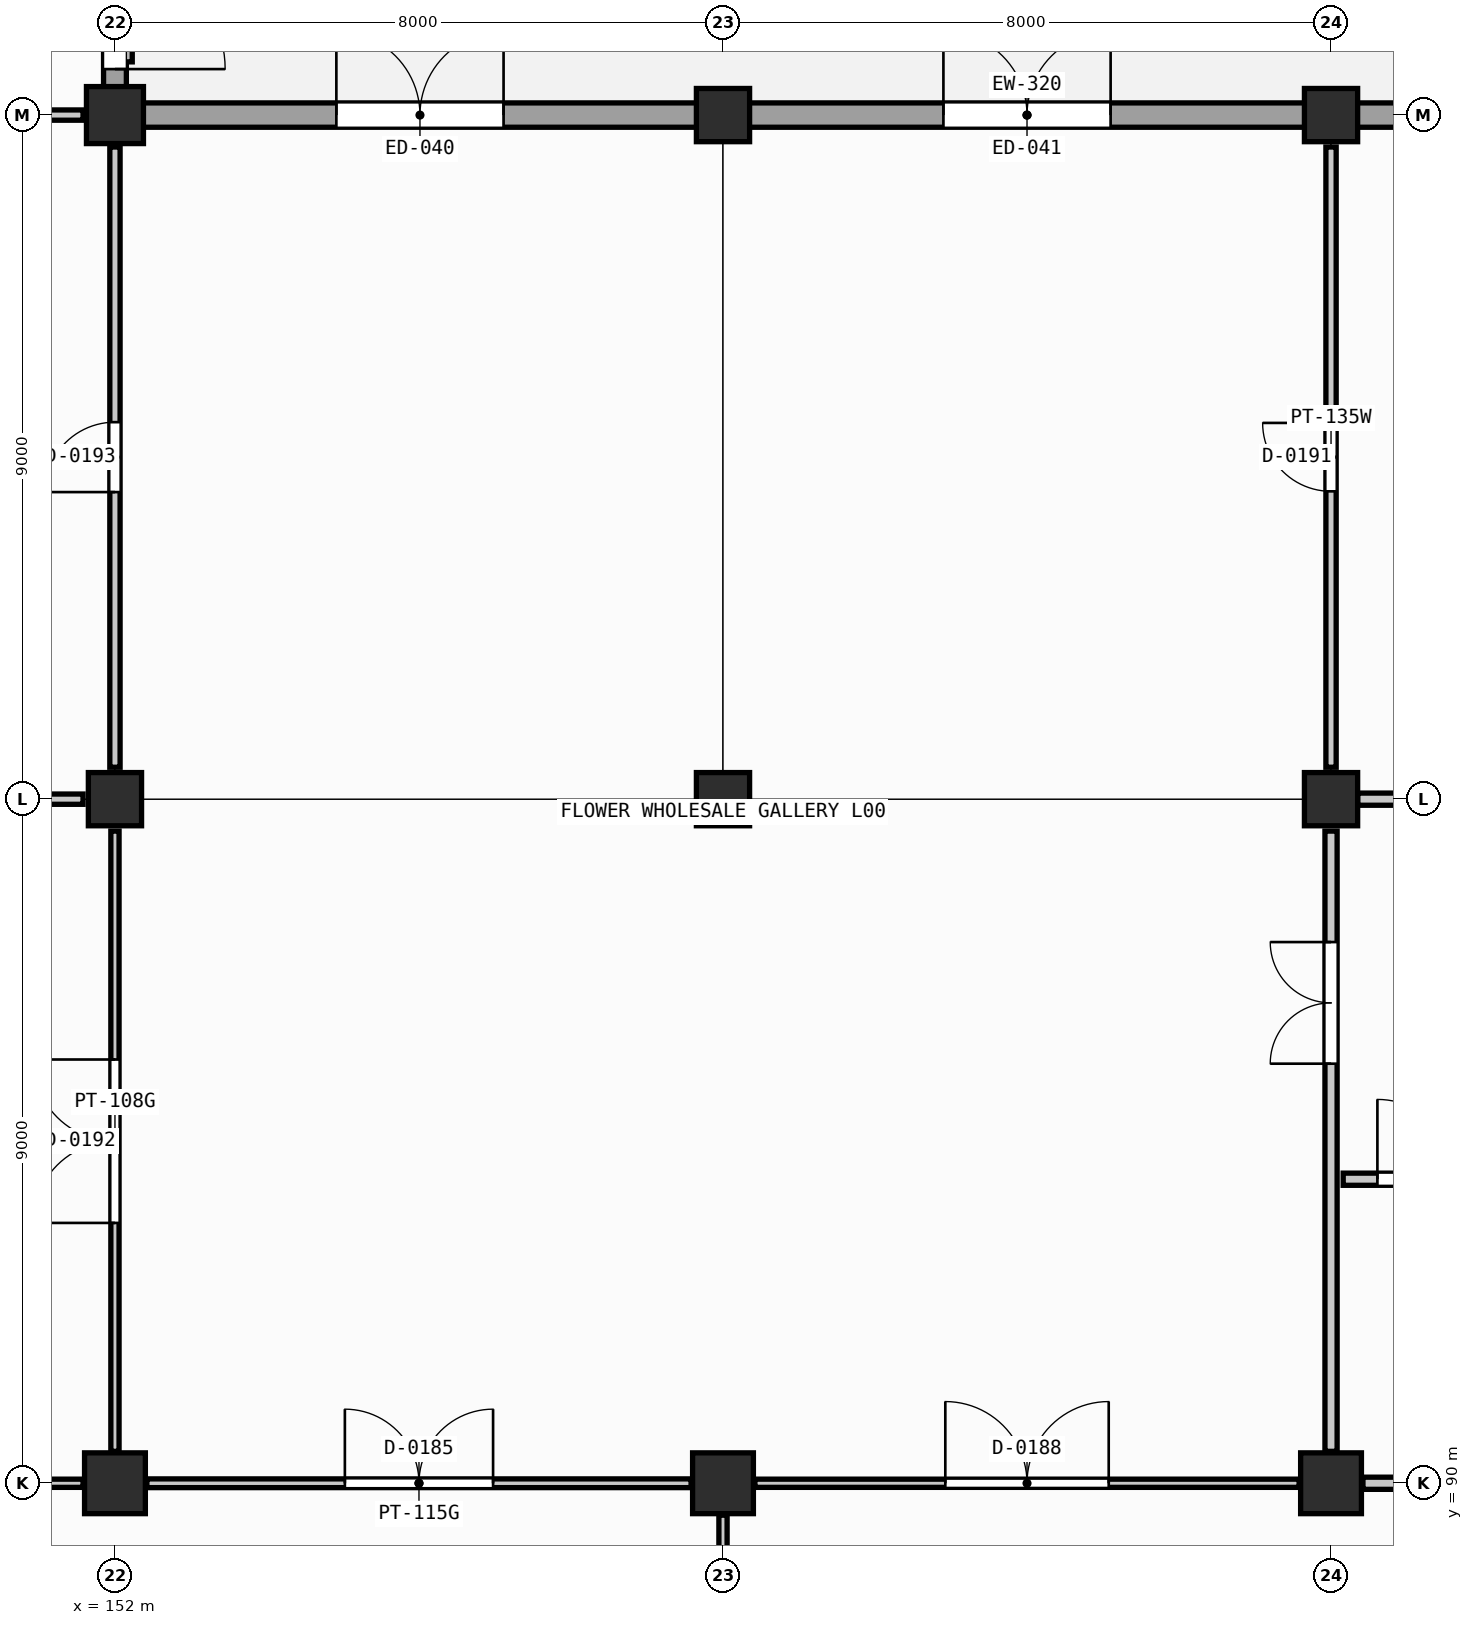
"""IFC4 building model, lengths in metres.
Left out: names, types, materials, properties, quantities, classifications, styles, units other than length and angle.
Written with IfcOpenShell. Run it as: python <this file> out.ifc"""

import sys

from ifc_helpers import new_model, si_unit, direction, frame, frame_2d, origin, origin_2d, place, context, subcontext, project, spatial, rectangle, extrude, element, fill, save


model = new_model("IFC4")
c1 = context("Model", 3, precision=1e-05, world=origin(), true_north=direction((0.0, 1.0)))
c2 = subcontext(c1, "Body", "Model", "MODEL_VIEW")
j1 = project(units=[si_unit("LENGTHUNIT", "METRE"), si_unit("PLANEANGLEUNIT", "RADIAN")], contexts=[c1])
p1 = place(None, origin())
s1 = spatial("IfcSite", under=j1, at=p1, CompositionType="ELEMENT")
p2 = place(p1, origin())
s2 = spatial("IfcBuilding", under=s1, at=p2, CompositionType="ELEMENT")
p3 = place(p2, origin())
s3 = spatial("IfcBuildingStorey", under=s2, at=p3, CompositionType="ELEMENT", Elevation=0.0)
p4 = place(p3, frame((152.0, 90.0, -1.25), z_axis=(0.0, 0.0, 1.0), x_axis=(1.0, 0.0, 0.0)))
e1 = element("IfcColumn", 1, at=p4, inside=s3, PredefinedType="COLUMN", context=c2, shape_type="SweptSolid", body=[
    extrude(rectangle(XDim=0.8, YDim=0.8, at=origin_2d()), origin(), (0.0, 0.0, 1.0), 6.05),
])
p5 = place(p3, frame((152.0, 99.0, -1.25), z_axis=(0.0, 0.0, 1.0), x_axis=(1.0, 0.0, 0.0)))
e2 = element("IfcColumn", 2, at=p5, inside=s3, PredefinedType="COLUMN", context=c2, shape_type="SweptSolid", body=[
    extrude(rectangle(XDim=0.7, YDim=0.7, at=origin_2d()), origin(), (0.0, 0.0, 1.0), 6.05),
])
p6 = place(p3, frame((152.0, 108.0, -1.25), z_axis=(0.0, 0.0, 1.0), x_axis=(1.0, 0.0, 0.0)))
e3 = element("IfcColumn", 3, at=p6, inside=s3, PredefinedType="COLUMN", context=c2, shape_type="SweptSolid", body=[
    extrude(rectangle(XDim=0.75, YDim=0.75, at=origin_2d()), origin(), (0.0, 0.0, 1.0), 6.05),
])
p7 = place(p3, frame((160.0, 90.0, -1.25), z_axis=(0.0, 0.0, 1.0), x_axis=(1.0, 0.0, 0.0)))
e4 = element("IfcColumn", 4, at=p7, inside=s3, PredefinedType="COLUMN", context=c2, shape_type="SweptSolid", body=[
    extrude(rectangle(XDim=0.8, YDim=0.8, at=origin_2d()), origin(), (0.0, 0.0, 1.0), 6.05),
])
for number, where, z_axis, x_axis in (
    (5, (160.0, 99.0, -1.25), (0.0, 0.0, 1.0), (1.0, 0.0, 0.0)),
    (6, (160.0, 108.0, -1.25), (0.0, 0.0, 1.0), (1.0, 0.0, 0.0)),
):
    element("IfcColumn", number, at=place(p3, frame(where, z_axis=z_axis, x_axis=x_axis)), inside=s3, PredefinedType="COLUMN", context=c2, shape_type="SweptSolid", body=[
        extrude(rectangle(XDim=0.7, YDim=0.7, at=origin_2d()), origin(), (0.0, 0.0, 1.0), 6.05),
    ])
p8 = place(p3, frame((168.0, 90.0, -1.25), z_axis=(0.0, 0.0, 1.0), x_axis=(1.0, 0.0, 0.0)))
e7 = element("IfcColumn", 7, at=p8, inside=s3, PredefinedType="COLUMN", context=c2, shape_type="SweptSolid", body=[
    extrude(rectangle(XDim=0.8, YDim=0.8, at=origin_2d()), origin(), (0.0, 0.0, 1.0), 6.05),
])
for number, where, z_axis, x_axis in (
    (8, (168.0, 99.0, -1.25), (0.0, 0.0, 1.0), (1.0, 0.0, 0.0)),
    (9, (168.0, 108.0, -1.25), (0.0, 0.0, 1.0), (1.0, 0.0, 0.0)),
):
    element("IfcColumn", number, at=place(p3, frame(where, z_axis=z_axis, x_axis=x_axis)), inside=s3, PredefinedType="COLUMN", context=c2, shape_type="SweptSolid", body=[
        extrude(rectangle(XDim=0.7, YDim=0.7, at=origin_2d()), origin(), (0.0, 0.0, 1.0), 6.05),
    ])
p9 = place(p3, frame((159.655, 108.0, 0.0), z_axis=(0.0, 0.0, 1.0), x_axis=(-1.0, 0.0, 0.0)))
e10 = element("IfcWall", 10, at=p9, inside=s3, PredefinedType="SOLIDWALL", context=c2, shape_type="SweptSolid", body=[
    extrude(rectangle(XDim=7.285, YDim=0.32, at=frame_2d((3.643, 0.0))), origin(), (0.0, 0.0, 1.0), 3.65),
])
p10 = place(p9, frame((2.542, 0.0, 0.0)))
e11 = element("IfcOpeningElement", 11, at=p10, cuts=e10, PredefinedType="OPENING", context=c2, shape_type="SweptSolid", body=[
    extrude(rectangle(XDim=2.2, YDim=2.3, at=frame_2d((1.1, 1.15))), frame((0.0, 0.17, 0.0), z_axis=(0.0, -1.0, 0.0), x_axis=(1.0, 0.0, 0.0)), (0.0, 0.0, 1.0), 0.34),
])
p11 = place(p3, frame((167.655, 108.0, 0.0), z_axis=(0.0, 0.0, 1.0), x_axis=(-1.0, 0.0, 0.0)))
e12 = element("IfcWall", 12, at=p11, inside=s3, PredefinedType="SOLIDWALL", context=c2, shape_type="SweptSolid", body=[
    extrude(rectangle(XDim=7.31, YDim=0.32, at=frame_2d((3.655, 0.0))), origin(), (0.0, 0.0, 1.0), 3.65),
])
p12 = place(p11, frame((2.555, 0.0, 0.0)))
e13 = element("IfcOpeningElement", 13, at=p12, cuts=e12, PredefinedType="OPENING", context=c2, shape_type="SweptSolid", body=[
    extrude(rectangle(XDim=2.2, YDim=2.3, at=frame_2d((1.1, 1.15))), frame((0.0, 0.17, 0.0), z_axis=(0.0, -1.0, 0.0), x_axis=(1.0, 0.0, 0.0)), (0.0, 0.0, 1.0), 0.34),
])
p13 = place(p3, frame((175.655, 108.0, 0.0), z_axis=(0.0, 0.0, 1.0), x_axis=(-1.0, 0.0, 0.0)))
e14 = element("IfcWall", 14, at=p13, inside=s3, PredefinedType="SOLIDWALL", context=c2, shape_type="SweptSolid", body=[
    extrude(rectangle(XDim=7.31, YDim=0.32, at=frame_2d((3.655, 0.0))), origin(), (0.0, 0.0, 1.0), 3.65),
])
p14 = place(p3, frame((152.0, 108.37, 0.0), z_axis=(0.0, 0.0, 1.0), x_axis=(0.0, 1.0, 0.0)))
e15 = element("IfcWall", 15, at=p14, inside=s3, PredefinedType="SOLIDWALL", context=c2, shape_type="SweptSolid", body=[
    extrude(rectangle(XDim=8.285, YDim=0.3, at=frame_2d((4.143, 0.0))), origin(), (0.0, 0.0, 1.0), 3.65),
])
p15 = place(p14, frame((3.417, 0.0, 0.0)))
e16 = element("IfcOpeningElement", 16, at=p15, cuts=e15, PredefinedType="OPENING", context=c2, shape_type="SweptSolid", body=[
    extrude(rectangle(XDim=1.45, YDim=2.2, at=frame_2d((0.725, 1.1))), frame((0.0, 0.16, 0.0), z_axis=(0.0, -1.0, 0.0), x_axis=(1.0, 0.0, 0.0)), (0.0, 0.0, 1.0), 0.32),
])
p16 = place(p14, frame((0.235, 0.0, 0.0)))
e17 = element("IfcOpeningElement", 17, at=p16, cuts=e15, PredefinedType="OPENING", context=c2, shape_type="SweptSolid", body=[
    extrude(rectangle(XDim=1.45, YDim=2.2, at=frame_2d((0.725, 1.1))), frame((0.0, 0.16, 0.0), z_axis=(0.0, -1.0, 0.0), x_axis=(1.0, 0.0, 0.0)), (0.0, 0.0, 1.0), 0.32),
])
p17 = place(p3, frame((168.0, 90.42, 0.0), z_axis=(0.0, 0.0, 1.0), x_axis=(0.0, 1.0, 0.0)))
e18 = element("IfcWall", 18, at=p17, inside=s3, PredefinedType="PARTITIONING", context=c2, shape_type="SweptSolid", body=[
    extrude(rectangle(XDim=8.16, YDim=0.16, at=frame_2d((4.08, 0.0))), origin(), (0.0, 0.0, 1.0), 3.65),
])
p18 = place(p17, frame((5.1, 0.0, 0.0)))
e19 = element("IfcOpeningElement", 19, at=p18, cuts=e18, PredefinedType="OPENING", context=c2, shape_type="SweptSolid", body=[
    extrude(rectangle(XDim=1.6, YDim=2.2, at=frame_2d((0.8, 1.1))), frame((0.0, 0.09, 0.0), z_axis=(0.0, -1.0, 0.0), x_axis=(1.0, 0.0, 0.0)), (0.0, 0.0, 1.0), 0.18),
])
p19 = place(p3, frame((168.42, 90.0, 0.0), z_axis=(0.0, 0.0, 1.0), x_axis=(1.0, 0.0, 0.0)))
e20 = element("IfcWall", 20, at=p19, inside=s3, PredefinedType="PARTITIONING", context=c2, shape_type="SweptSolid", body=[
    extrude(rectangle(XDim=7.16, YDim=0.16, at=frame_2d((3.58, 0.0))), origin(), (0.0, 0.0, 1.0), 3.65),
])
p20 = place(p3, frame((168.16, 94.0, 0.0), z_axis=(0.0, 0.0, 1.0), x_axis=(1.0, 0.0, 0.0)))
e21 = element("IfcWall", 21, at=p20, inside=s3, PredefinedType="PARTITIONING", context=c2, shape_type="SweptSolid", body=[
    extrude(rectangle(XDim=7.68, YDim=0.16, at=frame_2d((3.84, 0.0))), origin(), (0.0, 0.0, 1.0), 3.65),
])
p21 = place(p20, frame((0.45, 0.0, 0.0)))
e22 = element("IfcOpeningElement", 22, at=p21, cuts=e21, PredefinedType="OPENING", context=c2, shape_type="SweptSolid", body=[
    extrude(rectangle(XDim=1.05, YDim=2.1, at=frame_2d((0.525, 1.05))), frame((0.0, 0.09, 0.0), z_axis=(0.0, -1.0, 0.0), x_axis=(1.0, 0.0, 0.0)), (0.0, 0.0, 1.0), 0.18),
])
p22 = place(p20, frame((2.95, 0.0, 0.0)))
e23 = element("IfcOpeningElement", 23, at=p22, cuts=e21, PredefinedType="OPENING", context=c2, shape_type="SweptSolid", body=[
    extrude(rectangle(XDim=1.0, YDim=2.15, at=frame_2d((0.5, 1.075))), frame((0.0, 0.09, 0.0), z_axis=(0.0, -1.0, 0.0), x_axis=(1.0, 0.0, 0.0)), (0.0, 0.0, 1.0), 0.18),
])
p23 = place(p20, frame((5.35, 0.0, 0.0)))
e24 = element("IfcOpeningElement", 24, at=p23, cuts=e21, PredefinedType="OPENING", context=c2, shape_type="SweptSolid", body=[
    extrude(rectangle(XDim=1.1, YDim=2.15, at=frame_2d((0.55, 1.075))), frame((0.0, 0.09, 0.0), z_axis=(0.0, -1.0, 0.0), x_axis=(1.0, 0.0, 0.0)), (0.0, 0.0, 1.0), 0.18),
])
p24 = place(p3, frame((168.35, 99.0, 0.0), z_axis=(0.0, 0.0, 1.0), x_axis=(1.0, 0.0, 0.0)))
e25 = element("IfcWall", 25, at=p24, inside=s3, PredefinedType="PARTITIONING", context=c2, shape_type="SweptSolid", body=[
    extrude(rectangle(XDim=7.3, YDim=0.16, at=frame_2d((3.65, 0.0))), origin(), (0.0, 0.0, 1.0), 3.65),
])
p25 = place(p3, frame((160.0, 78.42, 0.0), z_axis=(0.0, 0.0, 1.0), x_axis=(0.0, 1.0, 0.0)))
e26 = element("IfcWall", 26, at=p25, inside=s3, PredefinedType="PARTITIONING", context=c2, shape_type="SweptSolid", body=[
    extrude(rectangle(XDim=11.16, YDim=0.108, at=frame_2d((5.58, 0.0))), origin(), (0.0, 0.0, 1.0), 3.65),
])
p26 = place(p3, frame((152.42, 90.0, 0.0), z_axis=(0.0, 0.0, 1.0), x_axis=(1.0, 0.0, 0.0)))
e27 = element("IfcWall", 27, at=p26, inside=s3, PredefinedType="PARTITIONING", context=c2, shape_type="SweptSolid", body=[
    extrude(rectangle(XDim=7.16, YDim=0.115, at=frame_2d((3.58, 0.0))), origin(), (0.0, 0.0, 1.0), 3.65),
])
p27 = place(p26, frame((2.605, 0.0, 0.0)))
e28 = element("IfcOpeningElement", 28, at=p27, cuts=e27, PredefinedType="OPENING", context=c2, shape_type="SweptSolid", body=[
    extrude(rectangle(XDim=1.95, YDim=2.3, at=frame_2d((0.975, 1.15))), frame((0.0, 0.067, 0.0), z_axis=(0.0, -1.0, 0.0), x_axis=(1.0, 0.0, 0.0)), (0.0, 0.0, 1.0), 0.135),
])
p28 = place(p3, frame((144.42, 90.0, 0.0), z_axis=(0.0, 0.0, 1.0), x_axis=(1.0, 0.0, 0.0)))
e29 = element("IfcWall", 29, at=p28, inside=s3, PredefinedType="PARTITIONING", context=c2, shape_type="SweptSolid", body=[
    extrude(rectangle(XDim=7.16, YDim=0.108, at=frame_2d((3.58, 0.0))), origin(), (0.0, 0.0, 1.0), 3.65),
])
p29 = place(p3, frame((160.42, 90.0, 0.0), z_axis=(0.0, 0.0, 1.0), x_axis=(1.0, 0.0, 0.0)))
e30 = element("IfcWall", 30, at=p29, inside=s3, PredefinedType="PARTITIONING", context=c2, shape_type="SweptSolid", body=[
    extrude(rectangle(XDim=7.16, YDim=0.108, at=frame_2d((3.58, 0.0))), origin(), (0.0, 0.0, 1.0), 3.65),
])
p30 = place(p29, frame((2.505, 0.0, 0.0)))
e31 = element("IfcOpeningElement", 31, at=p30, cuts=e30, PredefinedType="OPENING", context=c2, shape_type="SweptSolid", body=[
    extrude(rectangle(XDim=2.15, YDim=2.35, at=frame_2d((1.075, 1.175))), frame((0.0, 0.064, 0.0), z_axis=(0.0, -1.0, 0.0), x_axis=(1.0, 0.0, 0.0)), (0.0, 0.0, 1.0), 0.128),
])
p31 = place(p3, frame((168.0, 99.42, 0.0), z_axis=(0.0, 0.0, 1.0), x_axis=(0.0, 1.0, 0.0)))
e32 = element("IfcWall", 32, at=p31, inside=s3, PredefinedType="PLUMBINGWALL", context=c2, shape_type="SweptSolid", body=[
    extrude(rectangle(XDim=8.16, YDim=0.135, at=frame_2d((4.08, 0.0))), origin(), (0.0, 0.0, 1.0), 3.65),
])
p32 = place(p31, frame((3.63, 0.0, 0.0)))
e33 = element("IfcOpeningElement", 33, at=p32, cuts=e32, PredefinedType="OPENING", context=c2, shape_type="SweptSolid", body=[
    extrude(rectangle(XDim=0.9, YDim=2.06, at=frame_2d((0.45, 1.03))), frame((0.0, 0.078, 0.0), z_axis=(0.0, -1.0, 0.0), x_axis=(1.0, 0.0, 0.0)), (0.0, 0.0, 1.0), 0.155),
])
p33 = place(p3, frame((152.0, 90.42, 0.0), z_axis=(0.0, 0.0, 1.0), x_axis=(0.0, 1.0, 0.0)))
e34 = element("IfcWall", 34, at=p33, inside=s3, PredefinedType="PARTITIONING", context=c2, shape_type="SweptSolid", body=[
    extrude(rectangle(XDim=8.16, YDim=0.108, at=frame_2d((4.08, 0.0))), origin(), (0.0, 0.0, 1.0), 3.65),
])
p34 = place(p33, frame((3.005, 0.0, 0.0)))
e35 = element("IfcOpeningElement", 35, at=p34, cuts=e34, PredefinedType="OPENING", context=c2, shape_type="SweptSolid", body=[
    extrude(rectangle(XDim=2.15, YDim=2.35, at=frame_2d((1.075, 1.175))), frame((0.0, 0.064, 0.0), z_axis=(0.0, -1.0, 0.0), x_axis=(1.0, 0.0, 0.0)), (0.0, 0.0, 1.0), 0.128),
])
p35 = place(p3, frame((152.0, 99.42, 0.0), z_axis=(0.0, 0.0, 1.0), x_axis=(0.0, 1.0, 0.0)))
e36 = element("IfcWall", 36, at=p35, inside=s3, PredefinedType="PLUMBINGWALL", context=c2, shape_type="SweptSolid", body=[
    extrude(rectangle(XDim=8.16, YDim=0.135, at=frame_2d((4.08, 0.0))), origin(), (0.0, 0.0, 1.0), 3.65),
])
p36 = place(p35, frame((3.62, 0.0, 0.0)))
e37 = element("IfcOpeningElement", 37, at=p36, cuts=e36, PredefinedType="OPENING", context=c2, shape_type="SweptSolid", body=[
    extrude(rectangle(XDim=0.92, YDim=2.08, at=frame_2d((0.46, 1.04))), frame((0.0, 0.078, 0.0), z_axis=(0.0, -1.0, 0.0), x_axis=(1.0, 0.0, 0.0)), (0.0, 0.0, 1.0), 0.155),
])
p37 = place(p3, frame((144.42, 99.0, 0.0), z_axis=(0.0, 0.0, 1.0), x_axis=(1.0, 0.0, 0.0)))
e38 = element("IfcWall", 38, at=p37, inside=s3, PredefinedType="PLUMBINGWALL", context=c2, shape_type="SweptSolid", body=[
    extrude(rectangle(XDim=7.16, YDim=0.135, at=frame_2d((3.58, 0.0))), origin(), (0.0, 0.0, 1.0), 3.65),
])
p38 = place(p37, frame((3.12, 0.0, 0.0)))
e39 = element("IfcOpeningElement", 39, at=p38, cuts=e38, PredefinedType="OPENING", context=c2, shape_type="SweptSolid", body=[
    extrude(rectangle(XDim=0.92, YDim=2.08, at=frame_2d((0.46, 1.04))), frame((0.0, 0.078, 0.0), z_axis=(0.0, -1.0, 0.0), x_axis=(1.0, 0.0, 0.0)), (0.0, 0.0, 1.0), 0.155),
])
p39 = place(p3, frame((144.42, 108.0, 0.0), z_axis=(0.0, 0.0, 1.0), x_axis=(1.0, 0.0, 0.0)))
e40 = element("IfcWall", 40, at=p39, inside=s3, PredefinedType="PLUMBINGWALL", context=c2, shape_type="SweptSolid", body=[
    extrude(rectangle(XDim=7.16, YDim=0.135, at=frame_2d((3.58, 0.0))), origin(), (0.0, 0.0, 1.0), 3.65),
])
p40 = place(p39, frame((3.12, 0.0, 0.0)))
e41 = element("IfcOpeningElement", 41, at=p40, cuts=e40, PredefinedType="OPENING", context=c2, shape_type="SweptSolid", body=[
    extrude(rectangle(XDim=0.92, YDim=2.08, at=frame_2d((0.46, 1.04))), frame((0.0, 0.078, 0.0), z_axis=(0.0, -1.0, 0.0), x_axis=(1.0, 0.0, 0.0)), (0.0, 0.0, 1.0), 0.155),
])
p41 = place(p10, frame((2.2, 0.0, 0.0), z_axis=(0.0, 0.0, 1.0), x_axis=(-1.0, 0.0, 0.0)))
e42 = element("IfcDoor", 42, at=p41, inside=s3, OperationType="DOUBLE_DOOR_SINGLE_SWING", PredefinedType="DOOR", context=c2, shape_type="SweptSolid", body=[
    extrude(rectangle(XDim=2.2, YDim=2.3, at=frame_2d((1.1, 1.15))), frame((0.0, 0.025, 0.0), z_axis=(0.0, -1.0, 0.0), x_axis=(1.0, 0.0, 0.0)), (0.0, 0.0, 1.0), 0.05),
])
fill(e11, e42)
p42 = place(p12, frame((2.2, 0.0, 0.0), z_axis=(0.0, 0.0, 1.0), x_axis=(-1.0, 0.0, 0.0)))
e43 = element("IfcDoor", 43, at=p42, inside=s3, OperationType="DOUBLE_DOOR_SINGLE_SWING", PredefinedType="DOOR", context=c2, shape_type="SweptSolid", body=[
    extrude(rectangle(XDim=2.2, YDim=2.3, at=frame_2d((1.1, 1.15))), frame((0.0, 0.025, 0.0), z_axis=(0.0, -1.0, 0.0), x_axis=(1.0, 0.0, 0.0)), (0.0, 0.0, 1.0), 0.05),
])
fill(e13, e43)
p43 = place(p21, origin())
e44 = element("IfcDoor", 44, at=p43, inside=s3, OperationType="SINGLE_SWING_LEFT", PredefinedType="DOOR", context=c2, shape_type="SweptSolid", body=[
    extrude(rectangle(XDim=1.05, YDim=2.1, at=frame_2d((0.525, 1.05))), frame((0.0, 0.025, 0.0), z_axis=(0.0, -1.0, 0.0), x_axis=(1.0, 0.0, 0.0)), (0.0, 0.0, 1.0), 0.05),
])
fill(e22, e44)
p44 = place(p18, origin())
e45 = element("IfcDoor", 45, at=p44, inside=s3, OperationType="DOUBLE_DOOR_SINGLE_SWING", PredefinedType="DOOR", context=c2, shape_type="SweptSolid", body=[
    extrude(rectangle(XDim=1.6, YDim=2.2, at=frame_2d((0.8, 1.1))), frame((0.0, 0.025, 0.0), z_axis=(0.0, -1.0, 0.0), x_axis=(1.0, 0.0, 0.0)), (0.0, 0.0, 1.0), 0.05),
])
fill(e19, e45)
p45 = place(p27, origin())
e46 = element("IfcDoor", 46, at=p45, inside=s3, OperationType="DOUBLE_DOOR_SINGLE_SWING", PredefinedType="DOOR", context=c2, shape_type="SweptSolid", body=[
    extrude(rectangle(XDim=1.95, YDim=2.3, at=frame_2d((0.975, 1.15))), frame((0.0, 0.025, 0.0), z_axis=(0.0, -1.0, 0.0), x_axis=(1.0, 0.0, 0.0)), (0.0, 0.0, 1.0), 0.05),
])
fill(e28, e46)
p46 = place(p30, origin())
e47 = element("IfcDoor", 47, at=p46, inside=s3, OperationType="DOUBLE_DOOR_SINGLE_SWING", PredefinedType="DOOR", context=c2, shape_type="SweptSolid", body=[
    extrude(rectangle(XDim=2.15, YDim=2.35, at=frame_2d((1.075, 1.175))), frame((0.0, 0.025, 0.0), z_axis=(0.0, -1.0, 0.0), x_axis=(1.0, 0.0, 0.0)), (0.0, 0.0, 1.0), 0.05),
])
fill(e31, e47)
p47 = place(p32, origin())
e48 = element("IfcDoor", 48, at=p47, inside=s3, OperationType="SINGLE_SWING_RIGHT", PredefinedType="DOOR", context=c2, shape_type="SweptSolid", body=[
    extrude(rectangle(XDim=0.9, YDim=2.06, at=frame_2d((0.45, 1.03))), frame((0.0, 0.025, 0.0), z_axis=(0.0, -1.0, 0.0), x_axis=(1.0, 0.0, 0.0)), (0.0, 0.0, 1.0), 0.05),
])
fill(e33, e48)
p48 = place(p34, origin())
e49 = element("IfcDoor", 49, at=p48, inside=s3, OperationType="DOUBLE_DOOR_SINGLE_SWING", PredefinedType="DOOR", context=c2, shape_type="SweptSolid", body=[
    extrude(rectangle(XDim=2.15, YDim=2.35, at=frame_2d((1.075, 1.175))), frame((0.0, 0.025, 0.0), z_axis=(0.0, -1.0, 0.0), x_axis=(1.0, 0.0, 0.0)), (0.0, 0.0, 1.0), 0.05),
])
fill(e35, e49)
p49 = place(p36, origin())
e50 = element("IfcDoor", 50, at=p49, inside=s3, OperationType="SINGLE_SWING_LEFT", PredefinedType="DOOR", context=c2, shape_type="SweptSolid", body=[
    extrude(rectangle(XDim=0.92, YDim=2.08, at=frame_2d((0.46, 1.04))), frame((0.0, 0.025, 0.0), z_axis=(0.0, -1.0, 0.0), x_axis=(1.0, 0.0, 0.0)), (0.0, 0.0, 1.0), 0.05),
])
fill(e37, e50)
p50 = place(p16, frame((1.45, 0.0, 0.0), z_axis=(0.0, 0.0, 1.0), x_axis=(-1.0, 0.0, 0.0)))
e51 = element("IfcDoor", 51, at=p50, inside=s3, OperationType="SINGLE_SWING_LEFT", PredefinedType="DOOR", context=c2, shape_type="SweptSolid", body=[
    extrude(rectangle(XDim=1.45, YDim=2.2, at=frame_2d((0.725, 1.1))), frame((0.0, 0.025, 0.0), z_axis=(0.0, -1.0, 0.0), x_axis=(1.0, 0.0, 0.0)), (0.0, 0.0, 1.0), 0.05),
])
fill(e17, e51)
save(model, sys.argv[1])
